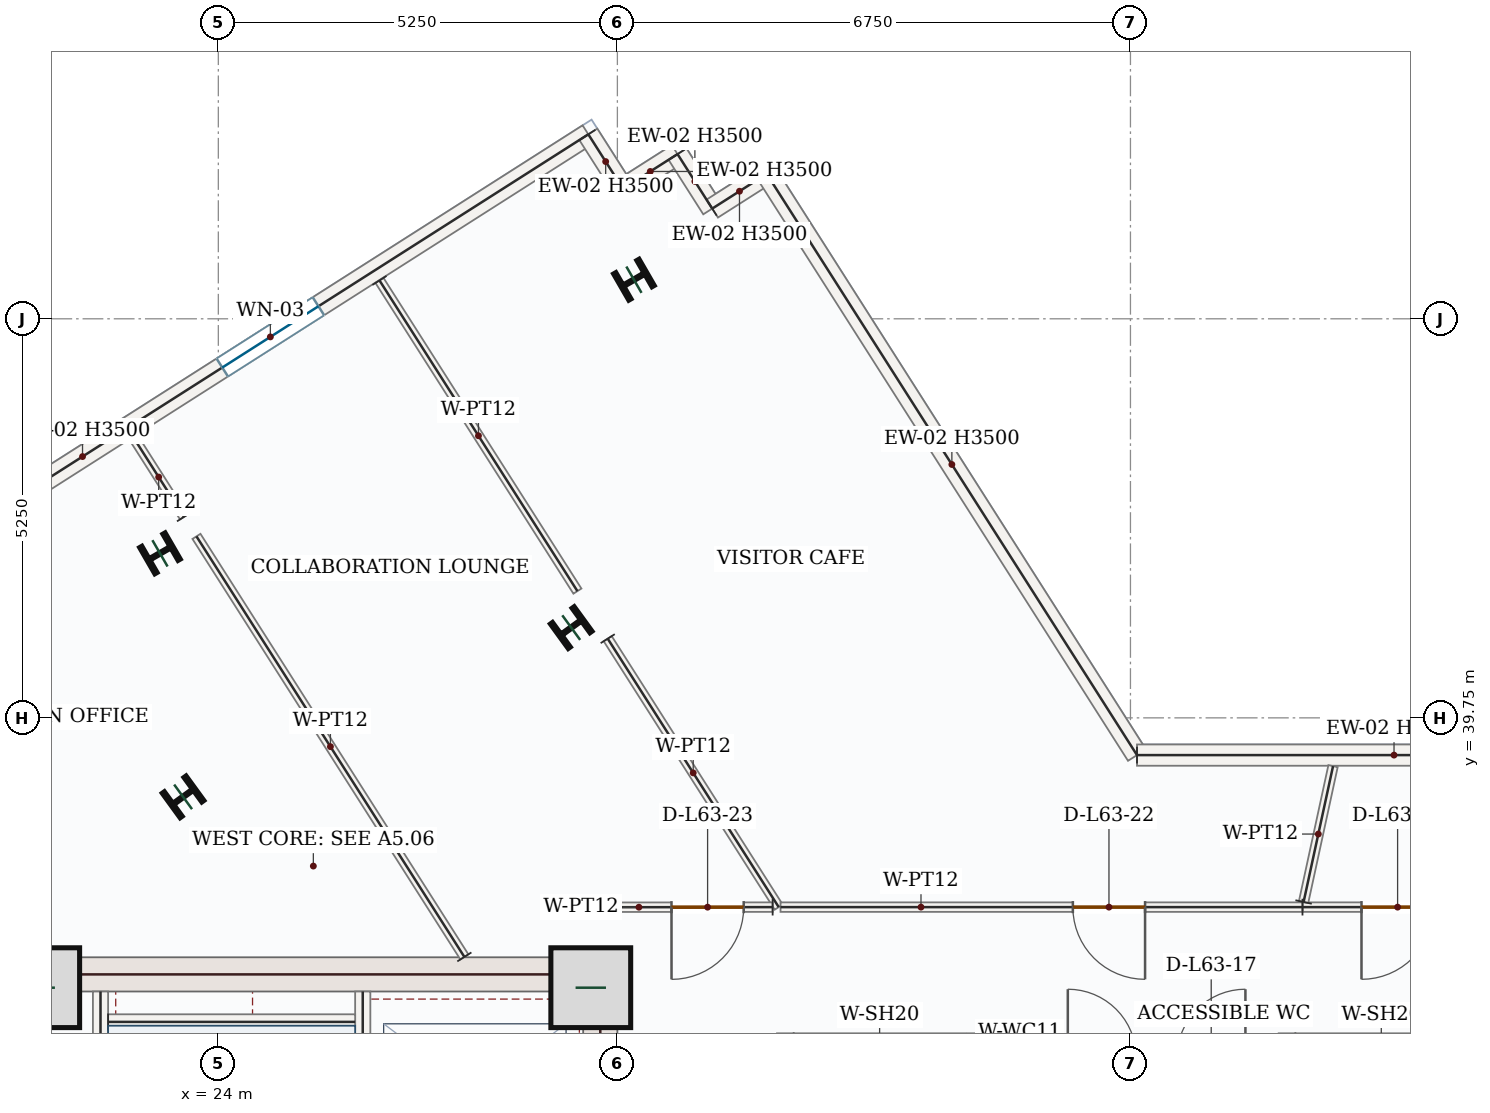
"""IFC4 building model, lengths in metres.
Left out: names, types, materials, properties, quantities, classifications, styles, units other than length and angle.
Written with IfcOpenShell. Run it as: python <this file> out.ifc"""

import sys

from ifc_helpers import new_model, si_unit, direction, frame, frame_2d, origin, origin_2d, place, context, subcontext, project, spatial, rectangle, i_section, extrude, source, transform, mapped, element, fill, save


model = new_model("IFC4")
c1 = context("Model", 3, precision=1e-05, world=origin(), true_north=direction((0.0, 1.0)))
c2 = subcontext(c1, "Body", "Model", "MODEL_VIEW")
j1 = project(units=[si_unit("LENGTHUNIT", "METRE"), si_unit("PLANEANGLEUNIT", "RADIAN")], contexts=[c1])
p1 = place(None, origin())
s1 = spatial("IfcSite", under=j1, at=p1, CompositionType="ELEMENT")
p2 = place(p1, origin())
s2 = spatial("IfcBuilding", under=s1, at=p2, CompositionType="ELEMENT")
p3 = place(p2, frame((0.0, 0.0, 265.35)))
s3 = spatial("IfcBuildingStorey", under=s2, at=p3, CompositionType="ELEMENT", Elevation=265.35)
p4 = place(p3, frame((29.025, 28.05, 0.0), z_axis=(0.0, 0.0, 1.0), x_axis=(0.0, 1.0, 0.0)))
e1 = element("IfcWall", 1, at=p4, inside=s3, PredefinedType="SHEAR", context=c2, shape_type="SweptSolid", body=[
    extrude(rectangle(XDim=8.55, YDim=0.45, at=frame_2d((4.275, 0.0))), origin(), (0.0, 0.0, 1.0), 3.5),
])
p5 = place(p4, frame((1.5, 0.0, 0.0)))
e2 = element("IfcOpeningElement", 2, at=p5, cuts=e1, PredefinedType="OPENING", context=c2, shape_type="SweptSolid", body=[
    extrude(rectangle(XDim=1.1, YDim=2.2, at=frame_2d((0.55, 1.1))), frame((0.0, 0.235, 0.0), z_axis=(0.0, -1.0, 0.0), x_axis=(1.0, 0.0, 0.0)), (0.0, 0.0, 1.0), 0.47),
])
m1 = source(origin(), c2, "Body", "SweptSolid", [
    extrude(rectangle(XDim=7.1, YDim=0.45, at=frame_2d((3.55, 0.0))), origin(), (0.0, 0.0, 1.0), 3.5),
])
p6 = place(p3, frame((21.7, 36.375, 0.0), z_axis=(0.0, 0.0, 1.0), x_axis=(1.0, 0.0, 0.0)))
e3 = element("IfcWall", 3, at=p6, inside=s3, PredefinedType="SHEAR", context=c2, shape_type="MappedRepresentation", body=[
    mapped(m1, transform((0.0, 0.0, 0.0), x_axis=(1.0, 0.0, 0.0), y_axis=(0.0, 1.0, 0.0), z_axis=(0.0, 0.0, 1.0), scale=1.0)),
])
m2 = source(origin(), c2, "Body", "SweptSolid", [
    extrude(rectangle(XDim=1.05, YDim=1.05, at=origin_2d()), origin(), (0.0, 0.0, 1.0), 3.75),
])
for number, where, z_axis, x_axis in (
    (4, (21.65, 36.2, 0.0), (0.0, 0.0, 1.0), (1.0, 0.0, 0.0)),
    (5, (28.9, 36.2, 0.0), (0.0, 0.0, 1.0), (1.0, 0.0, 0.0)),
):
    element("IfcColumn", number, at=place(p3, frame(where, z_axis=z_axis, x_axis=x_axis)), inside=s3, PredefinedType="COLUMN", context=c2, shape_type="MappedRepresentation", body=[
        mapped(m2, transform((0.0, 0.0, 0.0), x_axis=(1.0, 0.0, 0.0), y_axis=(0.0, 1.0, 0.0), z_axis=(0.0, 0.0, 1.0), scale=1.0)),
    ])
m3 = source(origin(), c2, "Body", "SweptSolid", [
    extrude(i_section(OverallWidth=0.399, OverallDepth=0.386, WebThickness=0.021, FlangeThickness=0.033, FilletRadius=0.018, at=origin_2d()), origin(), (0.0, 0.0, 1.0), 3.75),
])
for number, where, z_axis, x_axis in (
    (6, (28.643, 40.937, 0.0), (0.0, 0.0, 1.0), (-0.588, 0.809, 0.0)),
    (7, (23.536, 38.711, 0.0), (0.0, 0.0, 1.0), (-0.588, 0.809, 0.0)),
    (8, (29.468, 45.514, 0.0), (0.0, 0.0, 1.0), (-0.5, 0.866, 0.0)),
    (9, (23.232, 41.914, 0.0), (0.0, 0.0, 1.0), (-0.5, 0.866, 0.0)),
):
    element("IfcColumn", number, at=place(p3, frame(where, z_axis=z_axis, x_axis=x_axis)), inside=s3, PredefinedType="COLUMN", context=c2, shape_type="MappedRepresentation", body=[
        mapped(m3, transform((0.0, 0.0, 0.0), x_axis=(1.0, 0.0, 0.0), y_axis=(0.0, 1.0, 0.0), z_axis=(0.0, 0.0, 1.0), scale=1.0)),
    ])
p7 = place(p3, frame((20.501, 42.097, 0.0), z_axis=(0.0, 0.0, 1.0), x_axis=(0.843388777764, 0.537303796322, 0.0)))
e10 = element("IfcWall", 10, at=p7, inside=s3, PredefinedType="SOLIDWALL", context=c2, shape_type="SweptSolid", body=[
    extrude(rectangle(XDim=9.92, YDim=0.28, at=frame_2d((4.96, 0.0))), origin(), (0.0, 0.0, 1.0), 3.5),
])
p8 = place(p7, frame((4.21, 0.0, 0.85)))
e11 = element("IfcOpeningElement", 11, at=p8, cuts=e10, PredefinedType="OPENING", context=c2, shape_type="SweptSolid", body=[
    extrude(rectangle(XDim=1.5, YDim=1.5, at=frame_2d((0.75, 0.75))), frame((0.0, 0.15, 0.0), z_axis=(0.0, -1.0, 0.0), x_axis=(1.0, 0.0, 0.0)), (0.0, 0.0, 1.0), 0.3),
])
m4 = source(origin(), c2, "Body", "SweptSolid", [
    extrude(rectangle(XDim=0.85, YDim=0.28, at=frame_2d((0.425, 0.0))), origin(), (0.0, 0.0, 1.0), 3.5),
])
p9 = place(p3, frame((28.868, 47.427, 0.0), z_axis=(0.0, 0.0, 1.0), x_axis=(0.537210044462, -0.843448497615, 0.0)))
e12 = element("IfcWall", 12, at=p9, inside=s3, PredefinedType="SOLIDWALL", context=c2, shape_type="MappedRepresentation", body=[
    mapped(m4, transform((0.0, 0.0, 0.0), x_axis=(1.0, 0.0, 0.0), y_axis=(0.0, 1.0, 0.0), z_axis=(0.0, 0.0, 1.0), scale=1.0)),
])
m5 = source(origin(), c2, "Body", "SweptSolid", [
    extrude(rectangle(XDim=0.85, YDim=0.28, at=frame_2d((0.425, 0.0))), origin(), (0.0, 0.0, 1.0), 3.5),
])
p10 = place(p3, frame((29.324, 46.71, 0.0), z_axis=(0.0, 0.0, 1.0), x_axis=(0.843531374408, 0.537079901308, 0.0)))
e13 = element("IfcWall", 13, at=p10, inside=s3, PredefinedType="SOLIDWALL", context=c2, shape_type="MappedRepresentation", body=[
    mapped(m5, transform((0.0, 0.0, 0.0), x_axis=(1.0, 0.0, 0.0), y_axis=(0.0, 1.0, 0.0), z_axis=(0.0, 0.0, 1.0), scale=1.0)),
])
for number, where, z_axis, x_axis in (
    (14, (30.041, 47.167, 0.0), (0.0, 0.0, 1.0), (0.537, -0.843, 0.0)),
    (15, (30.498, 46.45, 0.0), (0.0, 0.0, 1.0), (0.843, 0.537, 0.0)),
):
    element("IfcWall", number, at=place(p3, frame(where, z_axis=z_axis, x_axis=x_axis)), inside=s3, PredefinedType="SOLIDWALL", context=c2, shape_type="MappedRepresentation", body=[
        mapped(m4, transform((0.0, 0.0, 0.0), x_axis=(1.0, 0.0, 0.0), y_axis=(0.0, 1.0, 0.0), z_axis=(0.0, 0.0, 1.0), scale=1.0)),
    ])
m6 = source(origin(), c2, "Body", "SweptSolid", [
    extrude(rectangle(XDim=9.066, YDim=0.28, at=frame_2d((4.533, 0.0))), origin(), (0.0, 0.0, 1.0), 3.5),
])
p11 = place(p3, frame((31.215, 46.906, 0.0), z_axis=(0.0, 0.0, 1.0), x_axis=(0.537298831286, -0.843391940855, 0.0)))
e16 = element("IfcWall", 16, at=p11, inside=s3, PredefinedType="SOLIDWALL", context=c2, shape_type="MappedRepresentation", body=[
    mapped(m6, transform((0.0, 0.0, 0.0), x_axis=(1.0, 0.0, 0.0), y_axis=(0.0, 1.0, 0.0), z_axis=(0.0, 0.0, 1.0), scale=1.0)),
])
m7 = source(origin(), c2, "Body", "SweptSolid", [
    extrude(rectangle(XDim=6.763, YDim=0.28, at=frame_2d((3.381, 0.0))), origin(), (0.0, 0.0, 1.0), 2.772),
])
p12 = place(p3, frame((36.086, 39.26, 0.0), z_axis=(0.0, 0.0, 1.0), x_axis=(1.0, 0.0, 0.0)))
e17 = element("IfcWall", 17, at=p12, inside=s3, PredefinedType="SOLIDWALL", context=c2, shape_type="MappedRepresentation", body=[
    mapped(m7, transform((0.0, 0.0, 0.0), x_axis=(1.0, 0.0, 0.0), y_axis=(0.0, 1.0, 0.0), z_axis=(0.0, 0.0, 1.0), scale=1.0)),
])
m8 = source(origin(), c2, "Body", "SweptSolid", [
    extrude(rectangle(XDim=7.87, YDim=0.2, at=frame_2d((3.935, 0.0))), origin(), (0.0, 0.0, 1.0), 3.5),
])
p13 = place(p3, frame((22.45, 28.28, 0.0), z_axis=(0.0, 0.0, 1.0), x_axis=(0.0, 1.0, 0.0)))
e18 = element("IfcWall", 18, at=p13, inside=s3, PredefinedType="SOLIDWALL", context=c2, shape_type="MappedRepresentation", body=[
    mapped(m8, transform((0.0, 0.0, 0.0), x_axis=(1.0, 0.0, 0.0), y_axis=(0.0, 1.0, 0.0), z_axis=(0.0, 0.0, 1.0), scale=1.0)),
])
p14 = place(p3, frame((25.9, 28.15, 0.0), z_axis=(0.0, 0.0, 1.0), x_axis=(0.0, 1.0, 0.0)))
e19 = element("IfcWall", 19, at=p14, inside=s3, PredefinedType="SOLIDWALL", context=c2, shape_type="SweptSolid", body=[
    extrude(rectangle(XDim=8.0, YDim=0.2, at=frame_2d((4.0, 0.0))), origin(), (0.0, 0.0, 1.0), 3.5),
])
p15 = place(p14, frame((0.4, 0.0, 0.0)))
e20 = element("IfcOpeningElement", 20, at=p15, cuts=e19, PredefinedType="OPENING", context=c2, shape_type="SweptSolid", body=[
    extrude(rectangle(XDim=1.05, YDim=2.15, at=frame_2d((0.525, 1.075))), frame((0.0, 0.11, 0.0), z_axis=(0.0, -1.0, 0.0), x_axis=(1.0, 0.0, 0.0)), (0.0, 0.0, 1.0), 0.22),
])
m9 = source(origin(), c2, "Body", "SweptSolid", [
    extrude(rectangle(XDim=3.25, YDim=0.2, at=frame_2d((1.625, 0.0))), origin(), (0.0, 0.0, 1.0), 3.5),
])
p16 = place(p3, frame((22.55, 35.75, 0.0), z_axis=(0.0, 0.0, 1.0), x_axis=(1.0, 0.0, 0.0)))
e21 = element("IfcWall", 21, at=p16, inside=s3, PredefinedType="SOLIDWALL", context=c2, shape_type="MappedRepresentation", body=[
    mapped(m9, transform((0.0, 0.0, 0.0), x_axis=(1.0, 0.0, 0.0), y_axis=(0.0, 1.0, 0.0), z_axis=(0.0, 0.0, 1.0), scale=1.0)),
])
p17 = place(p3, frame((31.45, 33.2, 0.0), z_axis=(0.0, 0.0, 1.0), x_axis=(0.0, 1.0, 0.0)))
e22 = element("IfcWall", 22, at=p17, inside=s3, PredefinedType="SOLIDWALL", context=c2, shape_type="SweptSolid", body=[
    extrude(rectangle(XDim=2.4, YDim=0.2, at=frame_2d((1.2, 0.0))), origin(), (0.0, 0.0, 1.0), 3.5),
])
p18 = place(p17, frame((0.65, 0.0, 0.0)))
e23 = element("IfcOpeningElement", 23, at=p18, cuts=e22, PredefinedType="OPENING", context=c2, shape_type="SweptSolid", body=[
    extrude(rectangle(XDim=1.1, YDim=2.15, at=frame_2d((0.55, 1.075))), frame((0.0, 0.11, 0.0), z_axis=(0.0, -1.0, 0.0), x_axis=(1.0, 0.0, 0.0)), (0.0, 0.0, 1.0), 0.22),
])
m10 = source(origin(), c2, "Body", "SweptSolid", [
    extrude(rectangle(XDim=2.4, YDim=0.2, at=frame_2d((1.2, 0.0))), origin(), (0.0, 0.0, 1.0), 3.5),
])
for number, where, z_axis, x_axis in (
    (24, (33.95, 33.2, 0.0), (0.0, 0.0, 1.0), (0.0, 1.0, 0.0)),
    (25, (38.05, 33.2, 0.0), (0.0, 0.0, 1.0), (0.0, 1.0, 0.0)),
):
    element("IfcWall", number, at=place(p3, frame(where, z_axis=z_axis, x_axis=x_axis)), inside=s3, PredefinedType="SOLIDWALL", context=c2, shape_type="MappedRepresentation", body=[
        mapped(m10, transform((0.0, 0.0, 0.0), x_axis=(1.0, 0.0, 0.0), y_axis=(0.0, 1.0, 0.0), z_axis=(0.0, 0.0, 1.0), scale=1.0)),
    ])
m11 = source(origin(), c2, "Body", "SweptSolid", [
    extrude(rectangle(XDim=4.188, YDim=0.125, at=frame_2d((2.094, 0.0))), origin(), (0.0, 0.0, 1.0), 3.5),
])
p19 = place(p3, frame((29.123, 40.792, 0.0), z_axis=(0.0, 0.0, 1.0), x_axis=(0.537264008944, -0.843414124078, 0.0)))
e26 = element("IfcWall", 26, at=p19, inside=s3, PredefinedType="PARTITIONING", context=c2, shape_type="MappedRepresentation", body=[
    mapped(m11, transform((0.0, 0.0, 0.0), x_axis=(1.0, 0.0, 0.0), y_axis=(0.0, 1.0, 0.0), z_axis=(0.0, 0.0, 1.0), scale=1.0)),
])
p20 = place(p3, frame((31.292, 37.26, 0.0), z_axis=(0.0, 0.0, 1.0), x_axis=(-0.999999820546, -0.000599089277, 0.0)))
e27 = element("IfcWall", 27, at=p20, inside=s3, PredefinedType="PARTITIONING", context=c2, shape_type="SweptSolid", body=[
    extrude(rectangle(XDim=2.038, YDim=0.125, at=frame_2d((1.019, 0.0))), origin(), (0.0, 0.0, 1.0), 3.5),
])
p21 = place(p20, frame((0.381, 0.0, 0.0)))
e28 = element("IfcOpeningElement", 28, at=p21, cuts=e27, PredefinedType="OPENING", context=c2, shape_type="SweptSolid", body=[
    extrude(rectangle(XDim=0.95, YDim=2.15, at=frame_2d((0.475, 1.075))), frame((0.0, 0.073, 0.0), z_axis=(0.0, -1.0, 0.0), x_axis=(1.0, 0.0, 0.0)), (0.0, 0.0, 1.0), 0.145),
])
m12 = source(origin(), c2, "Body", "SweptSolid", [
    extrude(rectangle(XDim=6.56, YDim=0.125, at=frame_2d((3.28, 0.0))), origin(), (0.0, 0.0, 1.0), 3.5),
])
p22 = place(p3, frame((27.237, 36.605, 0.0), z_axis=(0.0, 0.0, 1.0), x_axis=(-0.537282422054, 0.843402394443, 0.0)))
e29 = element("IfcWall", 29, at=p22, inside=s3, PredefinedType="PARTITIONING", context=c2, shape_type="MappedRepresentation", body=[
    mapped(m12, transform((0.0, 0.0, 0.0), x_axis=(1.0, 0.0, 0.0), y_axis=(0.0, 1.0, 0.0), z_axis=(0.0, 0.0, 1.0), scale=1.0)),
])
m13 = source(origin(), c2, "Body", "SweptSolid", [
    extrude(rectangle(XDim=1.241, YDim=0.125, at=frame_2d((0.621, 0.0))), origin(), (0.0, 0.0, 1.0), 3.5),
])
p23 = place(p3, frame((23.549, 42.394, 0.0), z_axis=(0.0, 0.0, 1.0), x_axis=(-0.537244446477, 0.843426585264, 0.0)))
e30 = element("IfcWall", 30, at=p23, inside=s3, PredefinedType="PARTITIONING", context=c2, shape_type="MappedRepresentation", body=[
    mapped(m13, transform((0.0, 0.0, 0.0), x_axis=(1.0, 0.0, 0.0), y_axis=(0.0, 1.0, 0.0), z_axis=(0.0, 0.0, 1.0), scale=1.0)),
])
m14 = source(origin(), c2, "Body", "SweptSolid", [
    extrude(rectangle(XDim=4.846, YDim=0.125, at=frame_2d((2.423, 0.0))), origin(), (0.0, 0.0, 1.0), 3.5),
])
p24 = place(p3, frame((26.12, 45.505, 0.0), z_axis=(0.0, 0.0, 1.0), x_axis=(0.537305688893, -0.843387572047, 0.0)))
e31 = element("IfcWall", 31, at=p24, inside=s3, PredefinedType="PARTITIONING", context=c2, shape_type="MappedRepresentation", body=[
    mapped(m14, transform((0.0, 0.0, 0.0), x_axis=(1.0, 0.0, 0.0), y_axis=(0.0, 1.0, 0.0), z_axis=(0.0, 0.0, 1.0), scale=1.0)),
])
p25 = place(p3, frame((42.742, 37.26, 0.0), z_axis=(0.0, 0.0, 1.0), x_axis=(-0.999999998515, 5.4504824e-05, 0.0)))
e32 = element("IfcWall", 32, at=p25, inside=s3, PredefinedType="PARTITIONING", context=c2, shape_type="SweptSolid", body=[
    extrude(rectangle(XDim=4.479, YDim=0.125, at=frame_2d((2.24, 0.0))), origin(), (0.0, 0.0, 1.0), 3.5),
])
p26 = place(p25, frame((2.753, 0.0, 0.0)))
e33 = element("IfcOpeningElement", 33, at=p26, cuts=e32, PredefinedType="OPENING", context=c2, shape_type="SweptSolid", body=[
    extrude(rectangle(XDim=0.95, YDim=2.15, at=frame_2d((0.475, 1.075))), frame((0.0, 0.073, 0.0), z_axis=(0.0, -1.0, 0.0), x_axis=(1.0, 0.0, 0.0)), (0.0, 0.0, 1.0), 0.145),
])
m15 = source(origin(), c2, "Body", "SweptSolid", [
    extrude(rectangle(XDim=1.829, YDim=0.125, at=frame_2d((0.915, 0.0))), origin(), (0.0, 0.0, 1.0), 3.5),
])
p27 = place(p3, frame((38.278, 37.327, 0.0), z_axis=(0.0, 0.0, 1.0), x_axis=(0.21182559105, 0.977307484355, 0.0)))
e34 = element("IfcWall", 34, at=p27, inside=s3, PredefinedType="PARTITIONING", context=c2, shape_type="MappedRepresentation", body=[
    mapped(m15, transform((0.0, 0.0, 0.0), x_axis=(1.0, 0.0, 0.0), y_axis=(0.0, 1.0, 0.0), z_axis=(0.0, 0.0, 1.0), scale=1.0)),
])
p28 = place(p3, frame((38.263, 37.26, 0.0), z_axis=(0.0, 0.0, 1.0), x_axis=(-1.0, 0.0, 0.0)))
e35 = element("IfcWall", 35, at=p28, inside=s3, PredefinedType="PARTITIONING", context=c2, shape_type="SweptSolid", body=[
    extrude(rectangle(XDim=6.867, YDim=0.125, at=frame_2d((3.434, 0.0))), origin(), (0.0, 0.0, 1.0), 3.5),
])
p29 = place(p28, frame((2.071, 0.0, 0.0)))
e36 = element("IfcOpeningElement", 36, at=p29, cuts=e35, PredefinedType="OPENING", context=c2, shape_type="SweptSolid", body=[
    extrude(rectangle(XDim=0.95, YDim=2.15, at=frame_2d((0.475, 1.075))), frame((0.0, 0.073, 0.0), z_axis=(0.0, -1.0, 0.0), x_axis=(1.0, 0.0, 0.0)), (0.0, 0.0, 1.0), 0.145),
])
m16 = source(origin(), c2, "Body", "SweptSolid", [
    extrude(rectangle(XDim=1.5, YDim=1.5, at=frame_2d((0.75, 0.75))), frame((0.0, 0.03, 0.0), z_axis=(0.0, -1.0, 0.0), x_axis=(1.0, 0.0, 0.0)), (0.0, 0.0, 1.0), 0.06),
])
p30 = place(p8, origin())
e37 = element("IfcWindow", 37, at=p30, inside=s3, PartitioningType="SINGLE_PANEL", PredefinedType="WINDOW", context=c2, shape_type="MappedRepresentation", body=[
    mapped(m16, transform((0.0, 0.0, 0.0), x_axis=(1.0, 0.0, 0.0), y_axis=(0.0, 1.0, 0.0), z_axis=(0.0, 0.0, 1.0), scale=1.0)),
])
fill(e11, e37)
m17 = source(origin(), c2, "Body", "SweptSolid", [
    extrude(rectangle(XDim=0.95, YDim=2.15, at=frame_2d((0.475, 1.075))), frame((0.0, 0.025, 0.0), z_axis=(0.0, -1.0, 0.0), x_axis=(1.0, 0.0, 0.0)), (0.0, 0.0, 1.0), 0.05),
])
p31 = place(p26, origin())
e38 = element("IfcDoor", 38, at=p31, inside=s3, OperationType="SINGLE_SWING_RIGHT", PredefinedType="DOOR", context=c2, shape_type="MappedRepresentation", body=[
    mapped(m17, transform((0.0, 0.0, 0.0), x_axis=(1.0, 0.0, 0.0), y_axis=(0.0, 1.0, 0.0), z_axis=(0.0, 0.0, 1.0), scale=1.0)),
])
fill(e33, e38)
p32 = place(p29, origin())
e39 = element("IfcDoor", 39, at=p32, inside=s3, OperationType="SINGLE_SWING_LEFT", PredefinedType="DOOR", context=c2, shape_type="MappedRepresentation", body=[
    mapped(m17, transform((0.0, 0.0, 0.0), x_axis=(1.0, 0.0, 0.0), y_axis=(0.0, 1.0, 0.0), z_axis=(0.0, 0.0, 1.0), scale=1.0)),
])
fill(e36, e39)
p33 = place(p21, origin())
e40 = element("IfcDoor", 40, at=p33, inside=s3, OperationType="SINGLE_SWING_RIGHT", PredefinedType="DOOR", context=c2, shape_type="MappedRepresentation", body=[
    mapped(m17, transform((0.0, 0.0, 0.0), x_axis=(1.0, 0.0, 0.0), y_axis=(0.0, 1.0, 0.0), z_axis=(0.0, 0.0, 1.0), scale=1.0)),
])
fill(e28, e40)
save(model, sys.argv[1])
